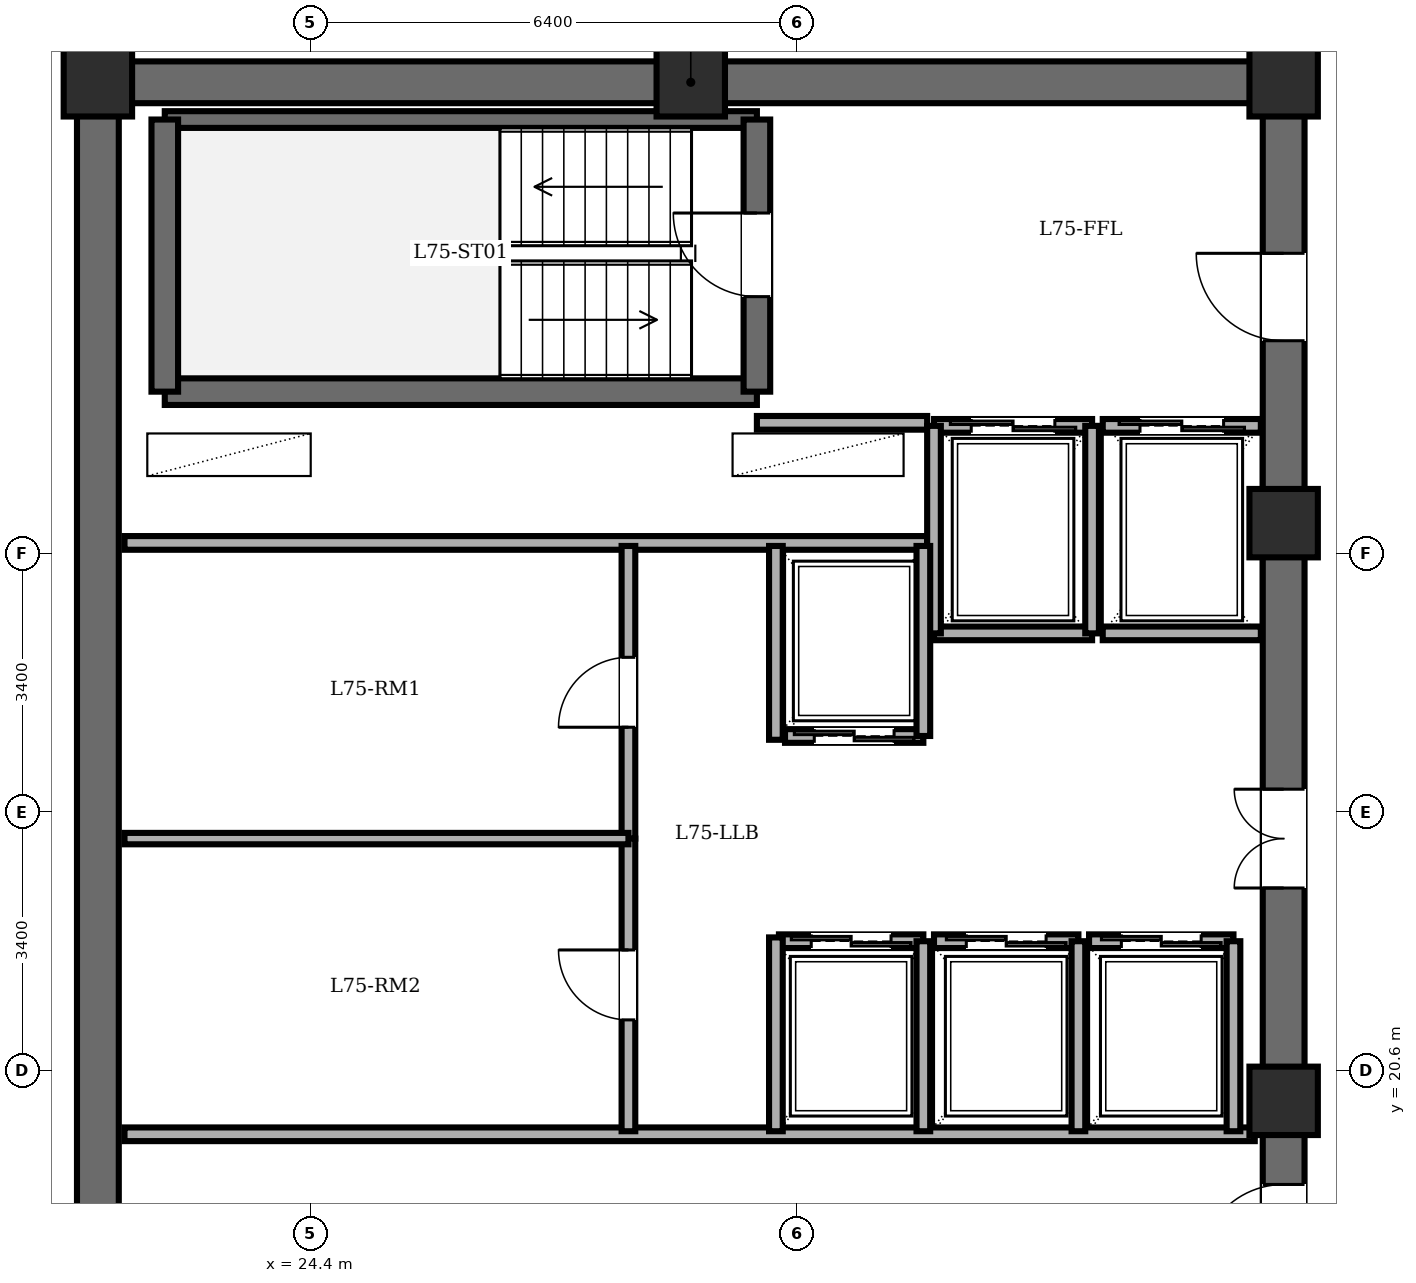
"""IFC4 building model, lengths in metres.
Left out: names, types, materials, properties, quantities, classifications, styles, units other than length and angle.
Written with IfcOpenShell. Run it as: python <this file> out.ifc"""

import sys

from ifc_helpers import new_model, si_unit, direction, frame, frame_2d, origin, origin_2d, place, context, subcontext, project, spatial, rectangle, extrude, element, fill, save


model = new_model("IFC4")
c1 = context("Model", 3, precision=1e-05, world=origin(), true_north=direction((0.0, 1.0)))
c2 = subcontext(c1, "Body", "Model", "MODEL_VIEW")
j1 = project(units=[si_unit("LENGTHUNIT", "METRE"), si_unit("PLANEANGLEUNIT", "RADIAN")], contexts=[c1])
p1 = place(None, origin())
s1 = spatial("IfcSite", under=j1, at=p1, CompositionType="ELEMENT")
p2 = place(p1, origin())
s2 = spatial("IfcBuilding", under=s1, at=p2, CompositionType="ELEMENT")
p3 = place(p2, frame((0.0, 0.0, 288.0)))
s3 = spatial("IfcBuildingStorey", under=s2, at=p3, CompositionType="ELEMENT", Elevation=288.0)
for number, where, z_axis, x_axis in (
    (1, (37.2, 20.2, 0.0), (0.0, 0.0, 1.0), (1.0, 0.0, 0.0)),
    (2, (37.2, 27.8, 0.0), (0.0, 0.0, 1.0), (1.0, 0.0, 0.0)),
    (3, (37.2, 33.6, 0.0), (0.0, 0.0, 1.0), (1.0, 0.0, 0.0)),
    (4, (29.4, 33.6, 0.0), (0.0, 0.0, 1.0), (1.0, 0.0, 0.0)),
    (5, (21.6, 33.6, 0.0), (0.0, 0.0, 1.0), (1.0, 0.0, 0.0)),
):
    element("IfcColumn", number, at=place(p3, frame(where, z_axis=z_axis, x_axis=x_axis)), inside=s3, PredefinedType="COLUMN", context=c2, shape_type="SweptSolid", body=[
        extrude(rectangle(XDim=0.9, YDim=0.9, at=origin_2d()), origin(), (0.0, 0.0, 1.0), 3.65),
    ])
p4 = place(p3, frame((21.6, 14.4, 0.0), z_axis=(0.0, 0.0, 1.0), x_axis=(0.0, 1.0, 0.0)))
e6 = element("IfcWall", 6, at=p4, inside=s3, PredefinedType="SHEAR", context=c2, shape_type="SweptSolid", body=[
    extrude(rectangle(XDim=19.2, YDim=0.55, at=frame_2d((9.6, 0.0))), origin(), (0.0, 0.0, 1.0), 3.45),
])
p5 = place(p3, frame((21.6, 33.6, 0.0), z_axis=(0.0, 0.0, 1.0), x_axis=(1.0, 0.0, 0.0)))
e7 = element("IfcWall", 7, at=p5, inside=s3, PredefinedType="SHEAR", context=c2, shape_type="SweptSolid", body=[
    extrude(rectangle(XDim=15.6, YDim=0.55, at=frame_2d((7.8, 0.0))), origin(), (0.0, 0.0, 1.0), 3.45),
])
p6 = place(p3, frame((37.2, 14.4, 0.0), z_axis=(0.0, 0.0, 1.0), x_axis=(0.0, 1.0, 0.0)))
e8 = element("IfcWall", 8, at=p6, inside=s3, PredefinedType="SHEAR", context=c2, shape_type="SweptSolid", body=[
    extrude(rectangle(XDim=19.2, YDim=0.55, at=frame_2d((9.6, 0.0))), origin(), (0.0, 0.0, 1.0), 3.45),
])
p7 = place(p6, frame((15.8, 0.0, 0.0)))
e9 = element("IfcOpeningElement", 9, at=p7, cuts=e8, PredefinedType="OPENING", context=c2, shape_type="SweptSolid", body=[
    extrude(rectangle(XDim=1.15, YDim=2.15, at=frame_2d((0.575, 1.075))), frame((0.0, 0.285, 0.0), z_axis=(0.0, -1.0, 0.0), x_axis=(1.0, 0.0, 0.0)), (0.0, 0.0, 1.0), 0.57),
])
p8 = place(p6, frame((3.6, 0.0, 0.0)))
e10 = element("IfcOpeningElement", 10, at=p8, cuts=e8, PredefinedType="OPENING", context=c2, shape_type="SweptSolid", body=[
    extrude(rectangle(XDim=1.1, YDim=2.15, at=frame_2d((0.55, 1.075))), frame((0.0, 0.285, 0.0), z_axis=(0.0, -1.0, 0.0), x_axis=(1.0, 0.0, 0.0)), (0.0, 0.0, 1.0), 0.57),
])
p9 = place(p6, frame((8.6, 0.0, 0.0)))
e11 = element("IfcOpeningElement", 11, at=p9, cuts=e8, PredefinedType="OPENING", context=c2, shape_type="SweptSolid", body=[
    extrude(rectangle(XDim=1.3, YDim=2.2, at=frame_2d((0.65, 1.1))), frame((0.0, 0.285, 0.0), z_axis=(0.0, -1.0, 0.0), x_axis=(1.0, 0.0, 0.0)), (0.0, 0.0, 1.0), 0.57),
])
p10 = place(p3, frame((22.48, 29.53, 0.0), z_axis=(0.0, 0.0, 1.0), x_axis=(1.0, 0.0, 0.0)))
e12 = element("IfcWall", 12, at=p10, inside=s3, PredefinedType="SOLIDWALL", context=c2, shape_type="SweptSolid", body=[
    extrude(rectangle(XDim=7.79, YDim=0.35, at=frame_2d((3.895, 0.0))), origin(), (0.0, 0.0, 1.0), 3.45),
])
p11 = place(p3, frame((22.48, 33.11, 0.0), z_axis=(0.0, 0.0, 1.0), x_axis=(1.0, 0.0, 0.0)))
e13 = element("IfcWall", 13, at=p11, inside=s3, PredefinedType="PARTITIONING", context=c2, shape_type="SweptSolid", body=[
    extrude(rectangle(XDim=7.79, YDim=0.22, at=frame_2d((3.895, 0.0))), origin(), (0.0, 0.0, 1.0), 3.45),
])
p12 = place(p3, frame((22.48, 29.53, 0.0), z_axis=(0.0, 0.0, 1.0), x_axis=(0.0, 1.0, 0.0)))
e14 = element("IfcWall", 14, at=p12, inside=s3, PredefinedType="SOLIDWALL", context=c2, shape_type="SweptSolid", body=[
    extrude(rectangle(XDim=3.58, YDim=0.35, at=frame_2d((1.79, 0.0))), origin(), (0.0, 0.0, 1.0), 3.45),
])
p13 = place(p3, frame((30.27, 29.53, 0.0), z_axis=(0.0, 0.0, 1.0), x_axis=(0.0, 1.0, 0.0)))
e15 = element("IfcWall", 15, at=p13, inside=s3, PredefinedType="SOLIDWALL", context=c2, shape_type="SweptSolid", body=[
    extrude(rectangle(XDim=3.58, YDim=0.35, at=frame_2d((1.79, 0.0))), origin(), (0.0, 0.0, 1.0), 3.45),
])
p14 = place(p13, frame((1.25, 0.0, 0.0)))
e16 = element("IfcOpeningElement", 16, at=p14, cuts=e15, PredefinedType="OPENING", context=c2, shape_type="SweptSolid", body=[
    extrude(rectangle(XDim=1.1, YDim=2.15, at=frame_2d((0.55, 1.075))), frame((0.0, 0.185, 0.0), z_axis=(0.0, -1.0, 0.0), x_axis=(1.0, 0.0, 0.0)), (0.0, 0.0, 1.0), 0.37),
])
p15 = place(p3, frame((30.27, 29.12, 0.0), z_axis=(0.0, 0.0, 1.0), x_axis=(1.0, 0.0, 0.0)))
e17 = element("IfcWall", 17, at=p15, inside=s3, PredefinedType="PARTITIONING", context=c2, shape_type="SweptSolid", body=[
    extrude(rectangle(XDim=2.24, YDim=0.18, at=frame_2d((1.12, 0.0))), origin(), (0.0, 0.0, 1.0), 3.45),
])
p16 = place(p3, frame((21.95, 27.54, 0.0), z_axis=(0.0, 0.0, 1.0), x_axis=(1.0, 0.0, 0.0)))
e18 = element("IfcWall", 18, at=p16, inside=s3, PredefinedType="PARTITIONING", context=c2, shape_type="SweptSolid", body=[
    extrude(rectangle(XDim=10.56, YDim=0.18, at=frame_2d((5.28, 0.0))), origin(), (0.0, 0.0, 1.0), 3.45),
])
p17 = place(p3, frame((21.95, 19.76, 0.0), z_axis=(0.0, 0.0, 1.0), x_axis=(1.0, 0.0, 0.0)))
e19 = element("IfcWall", 19, at=p17, inside=s3, PredefinedType="PARTITIONING", context=c2, shape_type="SweptSolid", body=[
    extrude(rectangle(XDim=14.87, YDim=0.18, at=frame_2d((7.435, 0.0))), origin(), (0.0, 0.0, 1.0), 3.45),
])
p18 = place(p3, frame((32.6, 29.08, 0.0), z_axis=(0.0, 0.0, 1.0), x_axis=(1.0, 0.0, 0.0)))
e20 = element("IfcWall", 20, at=p18, inside=s3, PredefinedType="PARTITIONING", context=c2, shape_type="SweptSolid", body=[
    extrude(rectangle(XDim=2.08, YDim=0.18, at=frame_2d((1.04, 0.0))), origin(), (0.0, 0.0, 1.0), 3.45),
])
p19 = place(p18, frame((0.49, 0.0, 0.0)))
e21 = element("IfcOpeningElement", 21, at=p19, cuts=e20, PredefinedType="OPENING", context=c2, shape_type="SweptSolid", body=[
    extrude(rectangle(XDim=1.1, YDim=2.2, at=frame_2d((0.55, 1.1))), frame((0.0, 0.1, 0.0), z_axis=(0.0, -1.0, 0.0), x_axis=(1.0, 0.0, 0.0)), (0.0, 0.0, 1.0), 0.2),
])
p20 = place(p3, frame((34.68, 26.35, 0.0), z_axis=(0.0, 0.0, 1.0), x_axis=(-1.0, 0.0, 0.0)))
e22 = element("IfcWall", 22, at=p20, inside=s3, PredefinedType="PARTITIONING", context=c2, shape_type="SweptSolid", body=[
    extrude(rectangle(XDim=2.08, YDim=0.18, at=frame_2d((1.04, 0.0))), origin(), (0.0, 0.0, 1.0), 3.45),
])
for number, where, z_axis, x_axis in (
    (23, (34.68, 26.35, 0.0), (0.0, 0.0, 1.0), (0.0, 1.0, 0.0)),
    (24, (32.6, 29.08, 0.0), (0.0, 0.0, 1.0), (0.0, -1.0, 0.0)),
):
    element("IfcWall", number, at=place(p3, frame(where, z_axis=z_axis, x_axis=x_axis)), inside=s3, PredefinedType="PARTITIONING", context=c2, shape_type="SweptSolid", body=[
        extrude(rectangle(XDim=2.73, YDim=0.18, at=frame_2d((1.365, 0.0))), origin(), (0.0, 0.0, 1.0), 3.45),
    ])
p21 = place(p3, frame((34.82, 29.08, 0.0), z_axis=(0.0, 0.0, 1.0), x_axis=(1.0, 0.0, 0.0)))
e25 = element("IfcWall", 25, at=p21, inside=s3, PredefinedType="PARTITIONING", context=c2, shape_type="SweptSolid", body=[
    extrude(rectangle(XDim=2.08, YDim=0.18, at=frame_2d((1.04, 0.0))), origin(), (0.0, 0.0, 1.0), 3.45),
])
p22 = place(p21, frame((0.49, 0.0, 0.0)))
e26 = element("IfcOpeningElement", 26, at=p22, cuts=e25, PredefinedType="OPENING", context=c2, shape_type="SweptSolid", body=[
    extrude(rectangle(XDim=1.1, YDim=2.2, at=frame_2d((0.55, 1.1))), frame((0.0, 0.1, 0.0), z_axis=(0.0, -1.0, 0.0), x_axis=(1.0, 0.0, 0.0)), (0.0, 0.0, 1.0), 0.2),
])
p23 = place(p3, frame((36.9, 26.35, 0.0), z_axis=(0.0, 0.0, 1.0), x_axis=(-1.0, 0.0, 0.0)))
e27 = element("IfcWall", 27, at=p23, inside=s3, PredefinedType="PARTITIONING", context=c2, shape_type="SweptSolid", body=[
    extrude(rectangle(XDim=2.08, YDim=0.18, at=frame_2d((1.04, 0.0))), origin(), (0.0, 0.0, 1.0), 3.45),
])
p24 = place(p3, frame((32.46, 25.0, 0.0), z_axis=(0.0, 0.0, 1.0), x_axis=(-1.0, 0.0, 0.0)))
e28 = element("IfcWall", 28, at=p24, inside=s3, PredefinedType="PARTITIONING", context=c2, shape_type="SweptSolid", body=[
    extrude(rectangle(XDim=1.82, YDim=0.18, at=frame_2d((0.91, 0.0))), origin(), (0.0, 0.0, 1.0), 3.45),
])
p25 = place(p24, frame((0.385, 0.0, 0.0)))
e29 = element("IfcOpeningElement", 29, at=p25, cuts=e28, PredefinedType="OPENING", context=c2, shape_type="SweptSolid", body=[
    extrude(rectangle(XDim=1.05, YDim=2.2, at=frame_2d((0.525, 1.1))), frame((0.0, 0.1, 0.0), z_axis=(0.0, -1.0, 0.0), x_axis=(1.0, 0.0, 0.0)), (0.0, 0.0, 1.0), 0.2),
])
p26 = place(p3, frame((32.46, 25.0, 0.0), z_axis=(0.0, 0.0, 1.0), x_axis=(0.0, 1.0, 0.0)))
e30 = element("IfcWall", 30, at=p26, inside=s3, PredefinedType="PARTITIONING", context=c2, shape_type="SweptSolid", body=[
    extrude(rectangle(XDim=2.5, YDim=0.18, at=frame_2d((1.25, 0.0))), origin(), (0.0, 0.0, 1.0), 3.45),
])
p27 = place(p3, frame((30.56, 22.3, 0.0), z_axis=(0.0, 0.0, 1.0), x_axis=(1.0, 0.0, 0.0)))
e31 = element("IfcWall", 31, at=p27, inside=s3, PredefinedType="PARTITIONING", context=c2, shape_type="SweptSolid", body=[
    extrude(rectangle(XDim=1.9, YDim=0.18, at=frame_2d((0.95, 0.0))), origin(), (0.0, 0.0, 1.0), 3.45),
])
p28 = place(p27, frame((0.425, 0.0, 0.0)))
e32 = element("IfcOpeningElement", 32, at=p28, cuts=e31, PredefinedType="OPENING", context=c2, shape_type="SweptSolid", body=[
    extrude(rectangle(XDim=1.05, YDim=2.2, at=frame_2d((0.525, 1.1))), frame((0.0, 0.1, 0.0), z_axis=(0.0, -1.0, 0.0), x_axis=(1.0, 0.0, 0.0)), (0.0, 0.0, 1.0), 0.2),
])
p29 = place(p3, frame((32.46, 19.8, 0.0), z_axis=(0.0, 0.0, 1.0), x_axis=(0.0, 1.0, 0.0)))
e33 = element("IfcWall", 33, at=p29, inside=s3, PredefinedType="PARTITIONING", context=c2, shape_type="SweptSolid", body=[
    extrude(rectangle(XDim=2.5, YDim=0.18, at=frame_2d((1.25, 0.0))), origin(), (0.0, 0.0, 1.0), 3.45),
])
p30 = place(p3, frame((32.6, 22.3, 0.0), z_axis=(0.0, 0.0, 1.0), x_axis=(1.0, 0.0, 0.0)))
e34 = element("IfcWall", 34, at=p30, inside=s3, PredefinedType="PARTITIONING", context=c2, shape_type="SweptSolid", body=[
    extrude(rectangle(XDim=1.9, YDim=0.18, at=frame_2d((0.95, 0.0))), origin(), (0.0, 0.0, 1.0), 3.45),
])
p31 = place(p30, frame((0.425, 0.0, 0.0)))
e35 = element("IfcOpeningElement", 35, at=p31, cuts=e34, PredefinedType="OPENING", context=c2, shape_type="SweptSolid", body=[
    extrude(rectangle(XDim=1.05, YDim=2.2, at=frame_2d((0.525, 1.1))), frame((0.0, 0.1, 0.0), z_axis=(0.0, -1.0, 0.0), x_axis=(1.0, 0.0, 0.0)), (0.0, 0.0, 1.0), 0.2),
])
p32 = place(p3, frame((34.5, 19.8, 0.0), z_axis=(0.0, 0.0, 1.0), x_axis=(0.0, 1.0, 0.0)))
e36 = element("IfcWall", 36, at=p32, inside=s3, PredefinedType="PARTITIONING", context=c2, shape_type="SweptSolid", body=[
    extrude(rectangle(XDim=2.5, YDim=0.18, at=frame_2d((1.25, 0.0))), origin(), (0.0, 0.0, 1.0), 3.45),
])
p33 = place(p3, frame((34.64, 22.3, 0.0), z_axis=(0.0, 0.0, 1.0), x_axis=(1.0, 0.0, 0.0)))
e37 = element("IfcWall", 37, at=p33, inside=s3, PredefinedType="PARTITIONING", context=c2, shape_type="SweptSolid", body=[
    extrude(rectangle(XDim=1.9, YDim=0.18, at=frame_2d((0.95, 0.0))), origin(), (0.0, 0.0, 1.0), 3.45),
])
p34 = place(p33, frame((0.425, 0.0, 0.0)))
e38 = element("IfcOpeningElement", 38, at=p34, cuts=e37, PredefinedType="OPENING", context=c2, shape_type="SweptSolid", body=[
    extrude(rectangle(XDim=1.05, YDim=2.2, at=frame_2d((0.525, 1.1))), frame((0.0, 0.1, 0.0), z_axis=(0.0, -1.0, 0.0), x_axis=(1.0, 0.0, 0.0)), (0.0, 0.0, 1.0), 0.2),
])
p35 = place(p3, frame((36.54, 19.8, 0.0), z_axis=(0.0, 0.0, 1.0), x_axis=(0.0, 1.0, 0.0)))
e39 = element("IfcWall", 39, at=p35, inside=s3, PredefinedType="PARTITIONING", context=c2, shape_type="SweptSolid", body=[
    extrude(rectangle(XDim=2.5, YDim=0.18, at=frame_2d((1.25, 0.0))), origin(), (0.0, 0.0, 1.0), 3.45),
])
for number, where, z_axis, x_axis in (
    (40, (30.52, 24.95, 0.0), (0.0, 0.0, 1.0), (0.0, 1.0, 0.0)),
    (41, (30.52, 19.8, 0.0), (0.0, 0.0, 1.0), (0.0, 1.0, 0.0)),
):
    element("IfcWall", number, at=place(p3, frame(where, z_axis=z_axis, x_axis=x_axis)), inside=s3, PredefinedType="PARTITIONING", context=c2, shape_type="SweptSolid", body=[
        extrude(rectangle(XDim=2.55, YDim=0.18, at=frame_2d((1.275, 0.0))), origin(), (0.0, 0.0, 1.0), 3.45),
    ])
p36 = place(p3, frame((28.58, 23.65, 0.0), z_axis=(0.0, 0.0, 1.0), x_axis=(0.0, 1.0, 0.0)))
e42 = element("IfcWall", 42, at=p36, inside=s3, PredefinedType="PARTITIONING", context=c2, shape_type="SweptSolid", body=[
    extrude(rectangle(XDim=3.85, YDim=0.18, at=frame_2d((1.925, 0.0))), origin(), (0.0, 0.0, 1.0), 3.45),
])
p37 = place(p36, frame((1.465, 0.0, 0.0)))
e43 = element("IfcOpeningElement", 43, at=p37, cuts=e42, PredefinedType="OPENING", context=c2, shape_type="SweptSolid", body=[
    extrude(rectangle(XDim=0.92, YDim=2.1, at=frame_2d((0.46, 1.05))), frame((0.0, 0.1, 0.0), z_axis=(0.0, -1.0, 0.0), x_axis=(1.0, 0.0, 0.0)), (0.0, 0.0, 1.0), 0.2),
])
p38 = place(p3, frame((28.58, 19.8, 0.0), z_axis=(0.0, 0.0, 1.0), x_axis=(0.0, 1.0, 0.0)))
e44 = element("IfcWall", 44, at=p38, inside=s3, PredefinedType="PARTITIONING", context=c2, shape_type="SweptSolid", body=[
    extrude(rectangle(XDim=3.85, YDim=0.18, at=frame_2d((1.925, 0.0))), origin(), (0.0, 0.0, 1.0), 3.45),
])
p39 = place(p38, frame((1.465, 0.0, 0.0)))
e45 = element("IfcOpeningElement", 45, at=p39, cuts=e44, PredefinedType="OPENING", context=c2, shape_type="SweptSolid", body=[
    extrude(rectangle(XDim=0.92, YDim=2.1, at=frame_2d((0.46, 1.05))), frame((0.0, 0.1, 0.0), z_axis=(0.0, -1.0, 0.0), x_axis=(1.0, 0.0, 0.0)), (0.0, 0.0, 1.0), 0.2),
])
p40 = place(p3, frame((21.95, 23.65, 0.0), z_axis=(0.0, 0.0, 1.0), x_axis=(1.0, 0.0, 0.0)))
e46 = element("IfcWall", 46, at=p40, inside=s3, PredefinedType="PARTITIONING", context=c2, shape_type="SweptSolid", body=[
    extrude(rectangle(XDim=6.63, YDim=0.15, at=frame_2d((3.315, 0.0))), origin(), (0.0, 0.0, 1.0), 3.45),
])
p41 = place(p14, origin())
e47 = element("IfcDoor", 47, at=p41, inside=s3, OperationType="SINGLE_SWING_RIGHT", PredefinedType="DOOR", context=c2, shape_type="SweptSolid", body=[
    extrude(rectangle(XDim=1.1, YDim=2.15, at=frame_2d((0.55, 1.075))), frame((0.0, 0.025, 0.0), z_axis=(0.0, -1.0, 0.0), x_axis=(1.0, 0.0, 0.0)), (0.0, 0.0, 1.0), 0.05),
])
fill(e16, e47)
p42 = place(p7, origin())
e48 = element("IfcDoor", 48, at=p42, inside=s3, OperationType="SINGLE_SWING_RIGHT", PredefinedType="DOOR", context=c2, shape_type="SweptSolid", body=[
    extrude(rectangle(XDim=1.15, YDim=2.15, at=frame_2d((0.575, 1.075))), frame((0.0, 0.025, 0.0), z_axis=(0.0, -1.0, 0.0), x_axis=(1.0, 0.0, 0.0)), (0.0, 0.0, 1.0), 0.05),
])
fill(e9, e48)
p43 = place(p8, origin())
e49 = element("IfcDoor", 49, at=p43, inside=s3, OperationType="SINGLE_SWING_LEFT", PredefinedType="DOOR", context=c2, shape_type="SweptSolid", body=[
    extrude(rectangle(XDim=1.1, YDim=2.15, at=frame_2d((0.55, 1.075))), frame((0.0, 0.025, 0.0), z_axis=(0.0, -1.0, 0.0), x_axis=(1.0, 0.0, 0.0)), (0.0, 0.0, 1.0), 0.05),
])
fill(e10, e49)
p44 = place(p19, origin())
e50 = element("IfcDoor", 50, at=p44, inside=s3, OperationType="DOUBLE_DOOR_SLIDING", PredefinedType="DOOR", context=c2, shape_type="SweptSolid", body=[
    extrude(rectangle(XDim=1.1, YDim=2.2, at=frame_2d((0.55, 1.1))), frame((0.0, 0.025, 0.0), z_axis=(0.0, -1.0, 0.0), x_axis=(1.0, 0.0, 0.0)), (0.0, 0.0, 1.0), 0.05),
])
fill(e21, e50)
p45 = place(p22, origin())
e51 = element("IfcDoor", 51, at=p45, inside=s3, OperationType="DOUBLE_DOOR_SLIDING", PredefinedType="DOOR", context=c2, shape_type="SweptSolid", body=[
    extrude(rectangle(XDim=1.1, YDim=2.2, at=frame_2d((0.55, 1.1))), frame((0.0, 0.025, 0.0), z_axis=(0.0, -1.0, 0.0), x_axis=(1.0, 0.0, 0.0)), (0.0, 0.0, 1.0), 0.05),
])
fill(e26, e51)
p46 = place(p25, origin())
e52 = element("IfcDoor", 52, at=p46, inside=s3, OperationType="DOUBLE_DOOR_SLIDING", PredefinedType="DOOR", context=c2, shape_type="SweptSolid", body=[
    extrude(rectangle(XDim=1.05, YDim=2.2, at=frame_2d((0.525, 1.1))), frame((0.0, 0.025, 0.0), z_axis=(0.0, -1.0, 0.0), x_axis=(1.0, 0.0, 0.0)), (0.0, 0.0, 1.0), 0.05),
])
fill(e29, e52)
p47 = place(p28, origin())
e53 = element("IfcDoor", 53, at=p47, inside=s3, OperationType="DOUBLE_DOOR_SLIDING", PredefinedType="DOOR", context=c2, shape_type="SweptSolid", body=[
    extrude(rectangle(XDim=1.05, YDim=2.2, at=frame_2d((0.525, 1.1))), frame((0.0, 0.025, 0.0), z_axis=(0.0, -1.0, 0.0), x_axis=(1.0, 0.0, 0.0)), (0.0, 0.0, 1.0), 0.05),
])
fill(e32, e53)
p48 = place(p31, origin())
e54 = element("IfcDoor", 54, at=p48, inside=s3, OperationType="DOUBLE_DOOR_SLIDING", PredefinedType="DOOR", context=c2, shape_type="SweptSolid", body=[
    extrude(rectangle(XDim=1.05, YDim=2.2, at=frame_2d((0.525, 1.1))), frame((0.0, 0.025, 0.0), z_axis=(0.0, -1.0, 0.0), x_axis=(1.0, 0.0, 0.0)), (0.0, 0.0, 1.0), 0.05),
])
fill(e35, e54)
p49 = place(p34, origin())
e55 = element("IfcDoor", 55, at=p49, inside=s3, OperationType="DOUBLE_DOOR_SLIDING", PredefinedType="DOOR", context=c2, shape_type="SweptSolid", body=[
    extrude(rectangle(XDim=1.05, YDim=2.2, at=frame_2d((0.525, 1.1))), frame((0.0, 0.025, 0.0), z_axis=(0.0, -1.0, 0.0), x_axis=(1.0, 0.0, 0.0)), (0.0, 0.0, 1.0), 0.05),
])
fill(e38, e55)
p50 = place(p37, origin())
e56 = element("IfcDoor", 56, at=p50, inside=s3, OperationType="SINGLE_SWING_LEFT", PredefinedType="DOOR", context=c2, shape_type="SweptSolid", body=[
    extrude(rectangle(XDim=0.92, YDim=2.1, at=frame_2d((0.46, 1.05))), frame((0.0, 0.025, 0.0), z_axis=(0.0, -1.0, 0.0), x_axis=(1.0, 0.0, 0.0)), (0.0, 0.0, 1.0), 0.05),
])
fill(e43, e56)
p51 = place(p39, origin())
e57 = element("IfcDoor", 57, at=p51, inside=s3, OperationType="SINGLE_SWING_RIGHT", PredefinedType="DOOR", context=c2, shape_type="SweptSolid", body=[
    extrude(rectangle(XDim=0.92, YDim=2.1, at=frame_2d((0.46, 1.05))), frame((0.0, 0.025, 0.0), z_axis=(0.0, -1.0, 0.0), x_axis=(1.0, 0.0, 0.0)), (0.0, 0.0, 1.0), 0.05),
])
fill(e45, e57)
p52 = place(p9, origin())
e58 = element("IfcDoor", 58, at=p52, inside=s3, OperationType="DOUBLE_DOOR_SINGLE_SWING", PredefinedType="DOOR", context=c2, shape_type="SweptSolid", body=[
    extrude(rectangle(XDim=1.3, YDim=2.2, at=frame_2d((0.65, 1.1))), frame((0.0, 0.025, 0.0), z_axis=(0.0, -1.0, 0.0), x_axis=(1.0, 0.0, 0.0)), (0.0, 0.0, 1.0), 0.05),
])
fill(e11, e58)
save(model, sys.argv[1])
